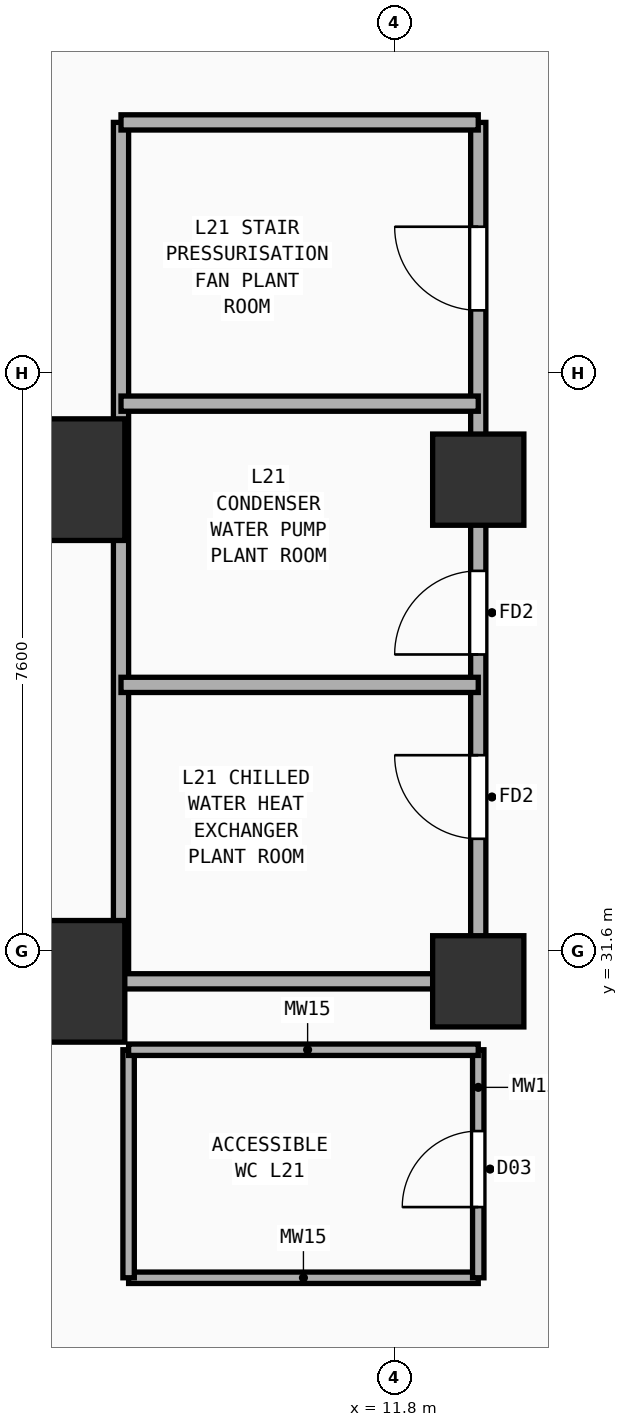
"""IFC4 building model, lengths in metres.
Left out: names, types, materials, properties, quantities, classifications, styles, units other than length and angle.
Written with IfcOpenShell. Run it as: python <this file> out.ifc"""

import sys

from ifc_helpers import new_model, si_unit, direction, frame, frame_2d, origin, origin_2d, place, context, subcontext, project, spatial, rectangle, extrude, element, fill, save


model = new_model("IFC4")
c1 = context("Model", 3, precision=1e-05, world=origin(), true_north=direction((0.0, 1.0)))
c2 = subcontext(c1, "Body", "Model", "MODEL_VIEW")
j1 = project(units=[si_unit("LENGTHUNIT", "METRE"), si_unit("PLANEANGLEUNIT", "RADIAN")], contexts=[c1])
p1 = place(None, origin())
s1 = spatial("IfcSite", under=j1, at=p1, CompositionType="ELEMENT")
p2 = place(p1, origin())
s2 = spatial("IfcBuilding", under=s1, at=p2, CompositionType="ELEMENT")
p3 = place(p2, frame((0.0, 0.0, 82.8)))
s3 = spatial("IfcBuildingStorey", under=s2, at=p3, CompositionType="ELEMENT", Elevation=82.8)
for number, where, z_axis, x_axis in (
    (1, (7.45, 31.2, 0.0), (0.0, 0.0, 1.0), (1.0, 0.0, 0.0)),
    (2, (7.45, 37.8, 0.0), (0.0, 0.0, 1.0), (1.0, 0.0, 0.0)),
):
    element("IfcColumn", number, at=place(p3, frame(where, z_axis=z_axis, x_axis=x_axis)), inside=s3, PredefinedType="COLUMN", context=c2, shape_type="SweptSolid", body=[
        extrude(rectangle(XDim=1.6, YDim=1.6, at=origin_2d()), origin(), (0.0, 0.0, 1.0), 4.84),
    ])
for number, where, z_axis, x_axis in (
    (3, (12.9, 31.2, 0.0), (0.0, 0.0, 1.0), (1.0, 0.0, 0.0)),
    (4, (12.9, 37.8, 0.0), (0.0, 0.0, 1.0), (1.0, 0.0, 0.0)),
):
    element("IfcColumn", number, at=place(p3, frame(where, z_axis=z_axis, x_axis=x_axis)), inside=s3, PredefinedType="COLUMN", context=c2, shape_type="SweptSolid", body=[
        extrude(rectangle(XDim=1.2, YDim=1.2, at=origin_2d()), origin(), (0.0, 0.0, 1.0), 4.84),
    ])
p4 = place(p3, frame((8.3, 27.3, 0.0), z_axis=(0.0, 0.0, 1.0), x_axis=(1.0, 0.0, 0.0)))
e5 = element("IfcWall", 5, at=p4, inside=s3, PredefinedType="PLUMBINGWALL", context=c2, shape_type="SweptSolid", body=[
    extrude(rectangle(XDim=4.6, YDim=0.15, at=frame_2d((2.3, 0.0))), origin(), (0.0, 0.0, 1.0), 4.84),
])
p5 = place(p3, frame((8.3, 27.3, 0.0), z_axis=(0.0, 0.0, 1.0), x_axis=(0.0, 1.0, 0.0)))
e6 = element("IfcWall", 6, at=p5, inside=s3, PredefinedType="PLUMBINGWALL", context=c2, shape_type="SweptSolid", body=[
    extrude(rectangle(XDim=3.0, YDim=0.15, at=frame_2d((1.5, 0.0))), origin(), (0.0, 0.0, 1.0), 4.84),
])
p6 = place(p3, frame((12.9, 27.3, 0.0), z_axis=(0.0, 0.0, 1.0), x_axis=(0.0, 1.0, 0.0)))
e7 = element("IfcWall", 7, at=p6, inside=s3, PredefinedType="PLUMBINGWALL", context=c2, shape_type="SweptSolid", body=[
    extrude(rectangle(XDim=3.0, YDim=0.15, at=frame_2d((1.5, 0.0))), origin(), (0.0, 0.0, 1.0), 3.94),
])
p7 = place(p6, frame((0.93, 0.0, 0.0)))
e8 = element("IfcOpeningElement", 8, at=p7, cuts=e7, PredefinedType="OPENING", context=c2, shape_type="SweptSolid", body=[
    extrude(rectangle(XDim=1.0, YDim=2.2, at=frame_2d((0.5, 1.1))), frame((0.0, 0.085, 0.0), z_axis=(0.0, -1.0, 0.0), x_axis=(1.0, 0.0, 0.0)), (0.0, 0.0, 1.0), 0.17),
])
p8 = place(p3, frame((8.3, 30.3, 0.0), z_axis=(0.0, 0.0, 1.0), x_axis=(1.0, 0.0, 0.0)))
e9 = element("IfcWall", 9, at=p8, inside=s3, PredefinedType="PLUMBINGWALL", context=c2, shape_type="SweptSolid", body=[
    extrude(rectangle(XDim=4.6, YDim=0.15, at=frame_2d((2.3, 0.0))), origin(), (0.0, 0.0, 1.0), 4.84),
])
p9 = place(p3, frame((12.9, 31.2, 0.0), z_axis=(0.0, 0.0, 1.0), x_axis=(0.0, 1.0, 0.0)))
e10 = element("IfcWall", 10, at=p9, inside=s3, PredefinedType="PARTITIONING", context=c2, shape_type="SweptSolid", body=[
    extrude(rectangle(XDim=11.3, YDim=0.2, at=frame_2d((5.65, 0.0))), origin(), (0.0, 0.0, 1.0), 3.94),
])
p10 = place(p9, frame((1.875, 0.0, 0.0)))
e11 = element("IfcOpeningElement", 11, at=p10, cuts=e10, PredefinedType="OPENING", context=c2, shape_type="SweptSolid", body=[
    extrude(rectangle(XDim=1.1, YDim=2.2, at=frame_2d((0.55, 1.1))), frame((0.0, 0.11, 0.0), z_axis=(0.0, -1.0, 0.0), x_axis=(1.0, 0.0, 0.0)), (0.0, 0.0, 1.0), 0.22),
])
p11 = place(p9, frame((4.3, 0.0, 0.0)))
e12 = element("IfcOpeningElement", 12, at=p11, cuts=e10, PredefinedType="OPENING", context=c2, shape_type="SweptSolid", body=[
    extrude(rectangle(XDim=1.1, YDim=2.2, at=frame_2d((0.55, 1.1))), frame((0.0, 0.11, 0.0), z_axis=(0.0, -1.0, 0.0), x_axis=(1.0, 0.0, 0.0)), (0.0, 0.0, 1.0), 0.22),
])
p12 = place(p9, frame((8.827, 0.0, 0.0)))
e13 = element("IfcOpeningElement", 13, at=p12, cuts=e10, PredefinedType="OPENING", context=c2, shape_type="SweptSolid", body=[
    extrude(rectangle(XDim=1.1, YDim=2.2, at=frame_2d((0.55, 1.1))), frame((0.0, 0.11, 0.0), z_axis=(0.0, -1.0, 0.0), x_axis=(1.0, 0.0, 0.0)), (0.0, 0.0, 1.0), 0.22),
])
p13 = place(p3, frame((8.2, 31.2, 0.0), z_axis=(0.0, 0.0, 1.0), x_axis=(0.0, 1.0, 0.0)))
e14 = element("IfcWall", 14, at=p13, inside=s3, PredefinedType="PARTITIONING", context=c2, shape_type="SweptSolid", body=[
    extrude(rectangle(XDim=11.3, YDim=0.2, at=frame_2d((5.65, 0.0))), origin(), (0.0, 0.0, 1.0), 4.84),
])
p14 = place(p3, frame((8.2, 31.2, 0.0), z_axis=(0.0, 0.0, 1.0), x_axis=(1.0, 0.0, 0.0)))
e15 = element("IfcWall", 15, at=p14, inside=s3, PredefinedType="PARTITIONING", context=c2, shape_type="SweptSolid", body=[
    extrude(rectangle(XDim=4.7, YDim=0.2, at=frame_2d((2.35, 0.0))), origin(), (0.0, 0.0, 1.0), 3.94),
])
p15 = place(p3, frame((8.2, 42.5, 0.0), z_axis=(0.0, 0.0, 1.0), x_axis=(1.0, 0.0, 0.0)))
e16 = element("IfcWall", 16, at=p15, inside=s3, PredefinedType="PARTITIONING", context=c2, shape_type="SweptSolid", body=[
    extrude(rectangle(XDim=4.7, YDim=0.2, at=frame_2d((2.35, 0.0))), origin(), (0.0, 0.0, 1.0), 4.39),
])
for number, where, z_axis, x_axis in (
    (17, (8.2, 35.1, 0.0), (0.0, 0.0, 1.0), (1.0, 0.0, 0.0)),
    (18, (8.2, 38.8, 0.0), (0.0, 0.0, 1.0), (1.0, 0.0, 0.0)),
):
    element("IfcWall", number, at=place(p3, frame(where, z_axis=z_axis, x_axis=x_axis)), inside=s3, PredefinedType="PARTITIONING", context=c2, shape_type="SweptSolid", body=[
        extrude(rectangle(XDim=4.7, YDim=0.2, at=frame_2d((2.35, 0.0))), origin(), (0.0, 0.0, 1.0), 4.84),
    ])
p16 = place(p7, origin())
e19 = element("IfcDoor", 19, at=p16, inside=s3, OperationType="SINGLE_SWING_LEFT", PredefinedType="DOOR", context=c2, shape_type="SweptSolid", body=[
    extrude(rectangle(XDim=1.0, YDim=2.2, at=frame_2d((0.5, 1.1))), frame((0.0, 0.025, 0.0), z_axis=(0.0, -1.0, 0.0), x_axis=(1.0, 0.0, 0.0)), (0.0, 0.0, 1.0), 0.05),
])
fill(e8, e19)
p17 = place(p10, origin())
e20 = element("IfcDoor", 20, at=p17, inside=s3, OperationType="SINGLE_SWING_RIGHT", PredefinedType="DOOR", context=c2, shape_type="SweptSolid", body=[
    extrude(rectangle(XDim=1.1, YDim=2.2, at=frame_2d((0.55, 1.1))), frame((0.0, 0.025, 0.0), z_axis=(0.0, -1.0, 0.0), x_axis=(1.0, 0.0, 0.0)), (0.0, 0.0, 1.0), 0.05),
])
fill(e11, e20)
p18 = place(p11, origin())
e21 = element("IfcDoor", 21, at=p18, inside=s3, OperationType="SINGLE_SWING_LEFT", PredefinedType="DOOR", context=c2, shape_type="SweptSolid", body=[
    extrude(rectangle(XDim=1.1, YDim=2.2, at=frame_2d((0.55, 1.1))), frame((0.0, 0.025, 0.0), z_axis=(0.0, -1.0, 0.0), x_axis=(1.0, 0.0, 0.0)), (0.0, 0.0, 1.0), 0.05),
])
fill(e12, e21)
p19 = place(p12, origin())
e22 = element("IfcDoor", 22, at=p19, inside=s3, OperationType="SINGLE_SWING_RIGHT", PredefinedType="DOOR", context=c2, shape_type="SweptSolid", body=[
    extrude(rectangle(XDim=1.1, YDim=2.2, at=frame_2d((0.55, 1.1))), frame((0.0, 0.025, 0.0), z_axis=(0.0, -1.0, 0.0), x_axis=(1.0, 0.0, 0.0)), (0.0, 0.0, 1.0), 0.05),
])
fill(e13, e22)
save(model, sys.argv[1])
